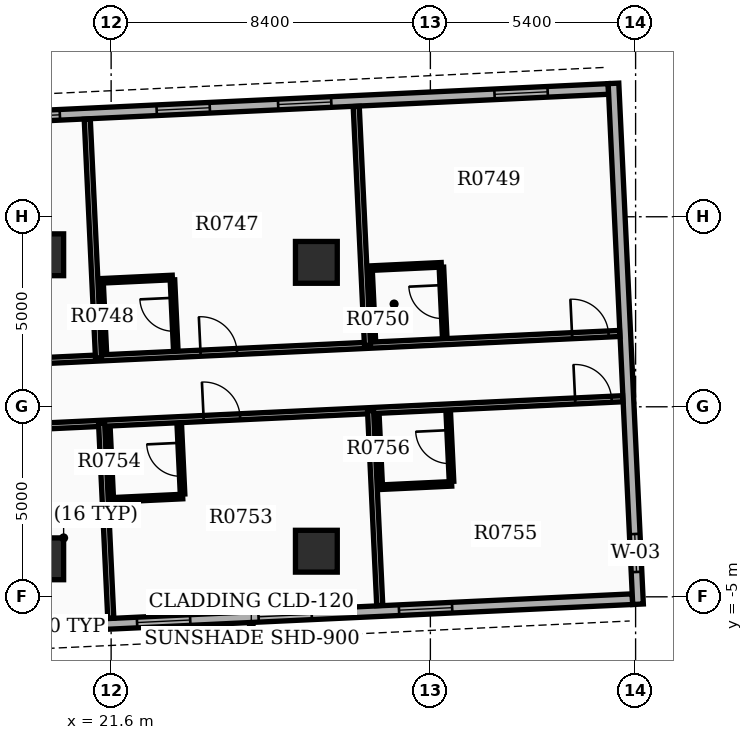
"""IFC4 building model, lengths in metres.
Left out: names, types, materials, properties, quantities, classifications, styles, units other than length and angle.
Written with IfcOpenShell. Run it as: python <this file> out.ifc"""

import sys

from ifc_helpers import new_model, si_unit, direction, frame, frame_2d, origin, origin_2d, place, context, subcontext, project, spatial, rectangle, extrude, element, fill, save


model = new_model("IFC4")
c1 = context("Model", 3, precision=1e-05, world=origin(), true_north=direction((0.0, 1.0)))
c2 = subcontext(c1, "Body", "Model", "MODEL_VIEW")
j1 = project(units=[si_unit("LENGTHUNIT", "METRE"), si_unit("PLANEANGLEUNIT", "RADIAN")], contexts=[c1])
p1 = place(None, origin())
s1 = spatial("IfcSite", under=j1, at=p1, CompositionType="ELEMENT")
p2 = place(p1, origin())
s2 = spatial("IfcBuilding", under=s1, at=p2, CompositionType="ELEMENT")
p3 = place(p2, frame((0.0, 0.0, 52.2)))
s3 = spatial("IfcBuildingStorey", under=s2, at=p3, CompositionType="ELEMENT", Elevation=52.2)
for number, where, z_axis, x_axis in (
    (1, (19.8, -4.0, 0.0), (0.0, 0.0, 1.0), (1.0, 0.0, 0.0)),
    (2, (19.8, 4.0, 0.0), (0.0, 0.0, 1.0), (1.0, 0.0, 0.0)),
    (3, (27.0, -3.8, 0.0), (0.0, 0.0, 1.0), (1.0, 0.0, 0.0)),
    (4, (27.0, 3.8, 0.0), (0.0, 0.0, 1.0), (1.0, 0.0, 0.0)),
):
    element("IfcColumn", number, at=place(p3, frame(where, z_axis=z_axis, x_axis=x_axis)), inside=s3, PredefinedType="COLUMN", context=c2, shape_type="SweptSolid", body=[
        extrude(rectangle(XDim=1.1, YDim=1.1, at=origin_2d()), origin(), (0.0, 0.0, 1.0), 3.9),
    ])
p4 = place(p3, frame((15.24, -6.009, 0.0), z_axis=(0.0, 0.0, 1.0), x_axis=(0.998890015344, 0.047103473814, 0.0)))
e5 = element("IfcWall", 5, at=p4, inside=s3, PredefinedType="STANDARD", context=c2, shape_type="SweptSolid", body=[
    extrude(rectangle(XDim=20.1, YDim=0.28, at=frame_2d((10.05, 0.0))), origin(), (0.0, 0.0, 1.0), 2.91),
])
p5 = place(p4, frame((1.6, 0.0, 0.8)))
e6 = element("IfcOpeningElement", 6, at=p5, cuts=e5, PredefinedType="OPENING", context=c2, shape_type="SweptSolid", body=[
    extrude(rectangle(XDim=1.4, YDim=1.6, at=frame_2d((0.7, 0.8))), frame((0.0, 0.15, 0.0), z_axis=(0.0, -1.0, 0.0), x_axis=(1.0, 0.0, 0.0)), (0.0, 0.0, 1.0), 0.3),
])
p6 = place(p4, frame((7.05, 0.0, 0.8)))
e7 = element("IfcOpeningElement", 7, at=p6, cuts=e5, PredefinedType="OPENING", context=c2, shape_type="SweptSolid", body=[
    extrude(rectangle(XDim=1.4, YDim=1.6, at=frame_2d((0.7, 0.8))), frame((0.0, 0.15, 0.0), z_axis=(0.0, -1.0, 0.0), x_axis=(1.0, 0.0, 0.0)), (0.0, 0.0, 1.0), 0.3),
])
p7 = place(p4, frame((10.25, 0.0, 0.8)))
e8 = element("IfcOpeningElement", 8, at=p7, cuts=e5, PredefinedType="OPENING", context=c2, shape_type="SweptSolid", body=[
    extrude(rectangle(XDim=1.4, YDim=1.6, at=frame_2d((0.7, 0.8))), frame((0.0, 0.15, 0.0), z_axis=(0.0, -1.0, 0.0), x_axis=(1.0, 0.0, 0.0)), (0.0, 0.0, 1.0), 0.3),
])
p8 = place(p4, frame((13.95, 0.0, 0.8)))
e9 = element("IfcOpeningElement", 9, at=p8, cuts=e5, PredefinedType="OPENING", context=c2, shape_type="SweptSolid", body=[
    extrude(rectangle(XDim=1.4, YDim=1.6, at=frame_2d((0.7, 0.8))), frame((0.0, 0.15, 0.0), z_axis=(0.0, -1.0, 0.0), x_axis=(1.0, 0.0, 0.0)), (0.0, 0.0, 1.0), 0.3),
])
p9 = place(p3, frame((34.685, 8.363, 0.0), z_axis=(0.0, 0.0, 1.0), x_axis=(-0.998890015344, -0.047103473814, 0.0)))
e10 = element("IfcWall", 10, at=p9, inside=s3, PredefinedType="STANDARD", context=c2, shape_type="SweptSolid", body=[
    extrude(rectangle(XDim=20.1, YDim=0.28, at=frame_2d((10.05, 0.0))), origin(), (0.0, 0.0, 1.0), 2.91),
])
p10 = place(p9, frame((1.6, 0.0, 0.8)))
e11 = element("IfcOpeningElement", 11, at=p10, cuts=e10, PredefinedType="OPENING", context=c2, shape_type="SweptSolid", body=[
    extrude(rectangle(XDim=1.4, YDim=1.6, at=frame_2d((0.7, 0.8))), frame((0.0, 0.15, 0.0), z_axis=(0.0, -1.0, 0.0), x_axis=(1.0, 0.0, 0.0)), (0.0, 0.0, 1.0), 0.3),
])
p11 = place(p9, frame((7.3, 0.0, 0.8)))
e12 = element("IfcOpeningElement", 12, at=p11, cuts=e10, PredefinedType="OPENING", context=c2, shape_type="SweptSolid", body=[
    extrude(rectangle(XDim=1.4, YDim=1.6, at=frame_2d((0.7, 0.8))), frame((0.0, 0.15, 0.0), z_axis=(0.0, -1.0, 0.0), x_axis=(1.0, 0.0, 0.0)), (0.0, 0.0, 1.0), 0.3),
])
p12 = place(p9, frame((10.5, 0.0, 0.8)))
e13 = element("IfcOpeningElement", 13, at=p12, cuts=e10, PredefinedType="OPENING", context=c2, shape_type="SweptSolid", body=[
    extrude(rectangle(XDim=1.4, YDim=1.6, at=frame_2d((0.7, 0.8))), frame((0.0, 0.15, 0.0), z_axis=(0.0, -1.0, 0.0), x_axis=(1.0, 0.0, 0.0)), (0.0, 0.0, 1.0), 0.3),
])
p13 = place(p9, frame((14.45, 0.0, 0.8)))
e14 = element("IfcOpeningElement", 14, at=p13, cuts=e10, PredefinedType="OPENING", context=c2, shape_type="SweptSolid", body=[
    extrude(rectangle(XDim=1.4, YDim=1.6, at=frame_2d((0.7, 0.8))), frame((0.0, 0.15, 0.0), z_axis=(0.0, -1.0, 0.0), x_axis=(1.0, 0.0, 0.0)), (0.0, 0.0, 1.0), 0.3),
])
p14 = place(p3, frame((35.464, -5.195, 0.0), z_axis=(0.0, 0.0, 1.0), x_axis=(-0.047101845086, 0.998890092147, 0.0)))
e15 = element("IfcWall", 15, at=p14, inside=s3, PredefinedType="STANDARD", context=c2, shape_type="SweptSolid", body=[
    extrude(rectangle(XDim=13.72, YDim=0.28, at=frame_2d((6.86, 0.0))), origin(), (0.0, 0.0, 1.0), 2.91),
])
p15 = place(p14, frame((0.85, 0.0, 0.85)))
e16 = element("IfcOpeningElement", 16, at=p15, cuts=e15, PredefinedType="OPENING", context=c2, shape_type="SweptSolid", body=[
    extrude(rectangle(XDim=1.0, YDim=1.5, at=frame_2d((0.5, 0.75))), frame((0.0, 0.15, 0.0), z_axis=(0.0, -1.0, 0.0), x_axis=(1.0, 0.0, 0.0)), (0.0, 0.0, 1.0), 0.3),
])
p16 = place(p3, frame((14.82, 0.979, 0.0), z_axis=(0.0, 0.0, 1.0), x_axis=(0.998889926753, 0.047105352469, 0.0)))
e17 = element("IfcWall", 17, at=p16, inside=s3, PredefinedType="PARTITIONING", context=c2, shape_type="SweptSolid", body=[
    extrude(rectangle(XDim=20.182, YDim=0.16, at=frame_2d((10.091, 0.0))), origin(), (0.0, 0.0, 1.0), 2.9),
])
p17 = place(p16, frame((2.626, 0.0, 0.0)))
e18 = element("IfcOpeningElement", 18, at=p17, cuts=e17, PredefinedType="OPENING", context=c2, shape_type="SweptSolid", body=[
    extrude(rectangle(XDim=0.96, YDim=2.15, at=frame_2d((0.48, 1.075))), frame((0.0, 0.09, 0.0), z_axis=(0.0, -1.0, 0.0), x_axis=(1.0, 0.0, 0.0)), (0.0, 0.0, 1.0), 0.18),
])
p18 = place(p16, frame((9.143, 0.0, 0.0)))
e19 = element("IfcOpeningElement", 19, at=p18, cuts=e17, PredefinedType="OPENING", context=c2, shape_type="SweptSolid", body=[
    extrude(rectangle(XDim=0.96, YDim=2.15, at=frame_2d((0.48, 1.075))), frame((0.0, 0.09, 0.0), z_axis=(0.0, -1.0, 0.0), x_axis=(1.0, 0.0, 0.0)), (0.0, 0.0, 1.0), 0.18),
])
p19 = place(p16, frame((18.93, 0.0, 0.0)))
e20 = element("IfcOpeningElement", 20, at=p19, cuts=e17, PredefinedType="OPENING", context=c2, shape_type="SweptSolid", body=[
    extrude(rectangle(XDim=0.96, YDim=2.15, at=frame_2d((0.48, 1.075))), frame((0.0, 0.09, 0.0), z_axis=(0.0, -1.0, 0.0), x_axis=(1.0, 0.0, 0.0)), (0.0, 0.0, 1.0), 0.18),
])
for number, where, z_axis, x_axis in (
    (21, (21.268, 1.283, 0.0), (0.0, 0.0, 1.0), (-0.047, 0.999, 0.0)),
    (22, (28.345, 1.617, 0.0), (0.0, 0.0, 1.0), (-0.047, 0.999, 0.0)),
):
    element("IfcWall", number, at=place(p3, frame(where, z_axis=z_axis, x_axis=x_axis)), inside=s3, PredefinedType="PARTITIONING", context=c2, shape_type="SweptSolid", body=[
        extrude(rectangle(XDim=6.292, YDim=0.16, at=frame_2d((3.146, 0.0))), origin(), (0.0, 0.0, 1.0), 2.9),
    ])
p20 = place(p3, frame((23.299, 1.519, 0.0), z_axis=(0.0, 0.0, 1.0), x_axis=(-0.047087116047, 0.998890786574, 0.0)))
e23 = element("IfcWall", 23, at=p20, inside=s3, PredefinedType="PARTITIONING", context=c2, shape_type="SweptSolid", body=[
    extrude(rectangle(XDim=1.82, YDim=0.12, at=frame_2d((0.91, 0.0))), origin(), (0.0, 0.0, 1.0), 2.9),
])
p21 = place(p20, frame((0.47, 0.0, 0.0)))
e24 = element("IfcOpeningElement", 24, at=p21, cuts=e23, PredefinedType="OPENING", context=c2, shape_type="SweptSolid", body=[
    extrude(rectangle(XDim=0.88, YDim=2.1, at=frame_2d((0.44, 1.05))), frame((0.0, 0.07, 0.0), z_axis=(0.0, -1.0, 0.0), x_axis=(1.0, 0.0, 0.0)), (0.0, 0.0, 1.0), 0.14),
])
p22 = place(p3, frame((21.421, 1.431, 0.0), z_axis=(0.0, 0.0, 1.0), x_axis=(-0.047080807099, 0.998891083954, 0.0)))
e25 = element("IfcWall", 25, at=p22, inside=s3, PredefinedType="PARTITIONING", context=c2, shape_type="SweptSolid", body=[
    extrude(rectangle(XDim=1.82, YDim=0.12, at=frame_2d((0.91, 0.0))), origin(), (0.0, 0.0, 1.0), 2.9),
])
p23 = place(p3, frame((21.333, 3.314, 0.0), z_axis=(0.0, 0.0, 1.0), x_axis=(0.998894425757, 0.04700985207, 0.0)))
e26 = element("IfcWall", 26, at=p23, inside=s3, PredefinedType="PARTITIONING", context=c2, shape_type="SweptSolid", body=[
    extrude(rectangle(XDim=1.88, YDim=0.12, at=frame_2d((0.94, 0.0))), origin(), (0.0, 0.0, 1.0), 2.9),
])
p24 = place(p3, frame((30.376, 1.853, 0.0), z_axis=(0.0, 0.0, 1.0), x_axis=(-0.047087116047, 0.998890786574, 0.0)))
e27 = element("IfcWall", 27, at=p24, inside=s3, PredefinedType="PARTITIONING", context=c2, shape_type="SweptSolid", body=[
    extrude(rectangle(XDim=1.82, YDim=0.12, at=frame_2d((0.91, 0.0))), origin(), (0.0, 0.0, 1.0), 2.9),
])
p25 = place(p24, frame((0.47, 0.0, 0.0)))
e28 = element("IfcOpeningElement", 28, at=p25, cuts=e27, PredefinedType="OPENING", context=c2, shape_type="SweptSolid", body=[
    extrude(rectangle(XDim=0.88, YDim=2.1, at=frame_2d((0.44, 1.05))), frame((0.0, 0.07, 0.0), z_axis=(0.0, -1.0, 0.0), x_axis=(1.0, 0.0, 0.0)), (0.0, 0.0, 1.0), 0.14),
])
p26 = place(p3, frame((28.499, 1.764, 0.0), z_axis=(0.0, 0.0, 1.0), x_axis=(-0.047080807099, 0.998891083954, 0.0)))
e29 = element("IfcWall", 29, at=p26, inside=s3, PredefinedType="PARTITIONING", context=c2, shape_type="SweptSolid", body=[
    extrude(rectangle(XDim=1.82, YDim=0.12, at=frame_2d((0.91, 0.0))), origin(), (0.0, 0.0, 1.0), 2.9),
])
p27 = place(p3, frame((28.41, 3.647, 0.0), z_axis=(0.0, 0.0, 1.0), x_axis=(0.998888319371, 0.047139425368, 0.0)))
e30 = element("IfcWall", 30, at=p27, inside=s3, PredefinedType="PARTITIONING", context=c2, shape_type="SweptSolid", body=[
    extrude(rectangle(XDim=1.88, YDim=0.12, at=frame_2d((0.94, 0.0))), origin(), (0.0, 0.0, 1.0), 2.9),
])
p28 = place(p3, frame((14.901, -0.739, 0.0), z_axis=(0.0, 0.0, 1.0), x_axis=(0.998889330628, 0.047117991871, 0.0)))
e31 = element("IfcWall", 31, at=p28, inside=s3, PredefinedType="PARTITIONING", context=c2, shape_type="SweptSolid", body=[
    extrude(rectangle(XDim=20.182, YDim=0.16, at=frame_2d((10.091, 0.0))), origin(), (0.0, 0.0, 1.0), 2.9),
])
p29 = place(p28, frame((2.626, 0.0, 0.0)))
e32 = element("IfcOpeningElement", 32, at=p29, cuts=e31, PredefinedType="OPENING", context=c2, shape_type="SweptSolid", body=[
    extrude(rectangle(XDim=0.96, YDim=2.15, at=frame_2d((0.48, 1.075))), frame((0.0, 0.09, 0.0), z_axis=(0.0, -1.0, 0.0), x_axis=(1.0, 0.0, 0.0)), (0.0, 0.0, 1.0), 0.18),
])
p30 = place(p28, frame((9.143, 0.0, 0.0)))
e33 = element("IfcOpeningElement", 33, at=p30, cuts=e31, PredefinedType="OPENING", context=c2, shape_type="SweptSolid", body=[
    extrude(rectangle(XDim=0.96, YDim=2.15, at=frame_2d((0.48, 1.075))), frame((0.0, 0.09, 0.0), z_axis=(0.0, -1.0, 0.0), x_axis=(1.0, 0.0, 0.0)), (0.0, 0.0, 1.0), 0.18),
])
p31 = place(p28, frame((18.93, 0.0, 0.0)))
e34 = element("IfcOpeningElement", 34, at=p31, cuts=e31, PredefinedType="OPENING", context=c2, shape_type="SweptSolid", body=[
    extrude(rectangle(XDim=0.96, YDim=2.15, at=frame_2d((0.48, 1.075))), frame((0.0, 0.09, 0.0), z_axis=(0.0, -1.0, 0.0), x_axis=(1.0, 0.0, 0.0)), (0.0, 0.0, 1.0), 0.18),
])
for number, where, z_axis, x_axis in (
    (35, (21.349, -0.435, 0.0), (0.0, 0.0, 1.0), (0.047, -0.999, 0.0)),
    (36, (28.426, -0.101, 0.0), (0.0, 0.0, 1.0), (0.047, -0.999, 0.0)),
):
    element("IfcWall", number, at=place(p3, frame(where, z_axis=z_axis, x_axis=x_axis)), inside=s3, PredefinedType="PARTITIONING", context=c2, shape_type="SweptSolid", body=[
        extrude(rectangle(XDim=5.132, YDim=0.16, at=frame_2d((2.566, 0.0))), origin(), (0.0, 0.0, 1.0), 2.9),
    ])
p32 = place(p3, frame((23.479, -2.296, 0.0), z_axis=(0.0, 0.0, 1.0), x_axis=(-0.047087116047, 0.998890786574, 0.0)))
e37 = element("IfcWall", 37, at=p32, inside=s3, PredefinedType="PARTITIONING", context=c2, shape_type="SweptSolid", body=[
    extrude(rectangle(XDim=1.82, YDim=0.12, at=frame_2d((0.91, 0.0))), origin(), (0.0, 0.0, 1.0), 2.9),
])
p33 = place(p32, frame((0.47, 0.0, 0.0)))
e38 = element("IfcOpeningElement", 38, at=p33, cuts=e37, PredefinedType="OPENING", context=c2, shape_type="SweptSolid", body=[
    extrude(rectangle(XDim=0.88, YDim=2.1, at=frame_2d((0.44, 1.05))), frame((0.0, 0.07, 0.0), z_axis=(0.0, -1.0, 0.0), x_axis=(1.0, 0.0, 0.0)), (0.0, 0.0, 1.0), 0.14),
])
p34 = place(p3, frame((21.601, -2.385, 0.0), z_axis=(0.0, 0.0, 1.0), x_axis=(-0.047087116047, 0.998890786574, 0.0)))
e39 = element("IfcWall", 39, at=p34, inside=s3, PredefinedType="PARTITIONING", context=c2, shape_type="SweptSolid", body=[
    extrude(rectangle(XDim=1.82, YDim=0.12, at=frame_2d((0.91, 0.0))), origin(), (0.0, 0.0, 1.0), 2.9),
])
p35 = place(p3, frame((21.604, -2.45, 0.0), z_axis=(0.0, 0.0, 1.0), x_axis=(0.998894425757, 0.04700985207, 0.0)))
e40 = element("IfcWall", 40, at=p35, inside=s3, PredefinedType="PARTITIONING", context=c2, shape_type="SweptSolid", body=[
    extrude(rectangle(XDim=1.88, YDim=0.12, at=frame_2d((0.94, 0.0))), origin(), (0.0, 0.0, 1.0), 2.9),
])
p36 = place(p3, frame((30.556, -1.963, 0.0), z_axis=(0.0, 0.0, 1.0), x_axis=(-0.047080807099, 0.998891083954, 0.0)))
e41 = element("IfcWall", 41, at=p36, inside=s3, PredefinedType="PARTITIONING", context=c2, shape_type="SweptSolid", body=[
    extrude(rectangle(XDim=1.82, YDim=0.12, at=frame_2d((0.91, 0.0))), origin(), (0.0, 0.0, 1.0), 2.9),
])
p37 = place(p36, frame((0.47, 0.0, 0.0)))
e42 = element("IfcOpeningElement", 42, at=p37, cuts=e41, PredefinedType="OPENING", context=c2, shape_type="SweptSolid", body=[
    extrude(rectangle(XDim=0.88, YDim=2.1, at=frame_2d((0.44, 1.05))), frame((0.0, 0.07, 0.0), z_axis=(0.0, -1.0, 0.0), x_axis=(1.0, 0.0, 0.0)), (0.0, 0.0, 1.0), 0.14),
])
p38 = place(p3, frame((28.678, -2.051, 0.0), z_axis=(0.0, 0.0, 1.0), x_axis=(-0.047087116047, 0.998890786574, 0.0)))
e43 = element("IfcWall", 43, at=p38, inside=s3, PredefinedType="PARTITIONING", context=c2, shape_type="SweptSolid", body=[
    extrude(rectangle(XDim=1.82, YDim=0.12, at=frame_2d((0.91, 0.0))), origin(), (0.0, 0.0, 1.0), 2.9),
])
p39 = place(p3, frame((28.681, -2.116, 0.0), z_axis=(0.0, 0.0, 1.0), x_axis=(0.998888319371, 0.047139425368, 0.0)))
e44 = element("IfcWall", 44, at=p39, inside=s3, PredefinedType="PARTITIONING", context=c2, shape_type="SweptSolid", body=[
    extrude(rectangle(XDim=1.88, YDim=0.12, at=frame_2d((0.94, 0.0))), origin(), (0.0, 0.0, 1.0), 2.9),
])
p40 = place(p6, origin())
e45 = element("IfcWindow", 45, at=p40, inside=s3, PartitioningType="SINGLE_PANEL", PredefinedType="WINDOW", context=c2, shape_type="SweptSolid", body=[
    extrude(rectangle(XDim=1.4, YDim=1.6, at=frame_2d((0.7, 0.8))), frame((0.0, 0.03, 0.0), z_axis=(0.0, -1.0, 0.0), x_axis=(1.0, 0.0, 0.0)), (0.0, 0.0, 1.0), 0.06),
])
fill(e7, e45)
p41 = place(p7, origin())
e46 = element("IfcWindow", 46, at=p41, inside=s3, PartitioningType="SINGLE_PANEL", PredefinedType="WINDOW", context=c2, shape_type="SweptSolid", body=[
    extrude(rectangle(XDim=1.4, YDim=1.6, at=frame_2d((0.7, 0.8))), frame((0.0, 0.03, 0.0), z_axis=(0.0, -1.0, 0.0), x_axis=(1.0, 0.0, 0.0)), (0.0, 0.0, 1.0), 0.06),
])
fill(e8, e46)
p42 = place(p8, origin())
e47 = element("IfcWindow", 47, at=p42, inside=s3, PartitioningType="SINGLE_PANEL", PredefinedType="WINDOW", context=c2, shape_type="SweptSolid", body=[
    extrude(rectangle(XDim=1.4, YDim=1.6, at=frame_2d((0.7, 0.8))), frame((0.0, 0.03, 0.0), z_axis=(0.0, -1.0, 0.0), x_axis=(1.0, 0.0, 0.0)), (0.0, 0.0, 1.0), 0.06),
])
fill(e9, e47)
p43 = place(p10, origin())
e48 = element("IfcWindow", 48, at=p43, inside=s3, PartitioningType="SINGLE_PANEL", PredefinedType="WINDOW", context=c2, shape_type="SweptSolid", body=[
    extrude(rectangle(XDim=1.4, YDim=1.6, at=frame_2d((0.7, 0.8))), frame((0.0, 0.03, 0.0), z_axis=(0.0, -1.0, 0.0), x_axis=(1.0, 0.0, 0.0)), (0.0, 0.0, 1.0), 0.06),
])
fill(e11, e48)
p44 = place(p11, origin())
e49 = element("IfcWindow", 49, at=p44, inside=s3, PartitioningType="SINGLE_PANEL", PredefinedType="WINDOW", context=c2, shape_type="SweptSolid", body=[
    extrude(rectangle(XDim=1.4, YDim=1.6, at=frame_2d((0.7, 0.8))), frame((0.0, 0.03, 0.0), z_axis=(0.0, -1.0, 0.0), x_axis=(1.0, 0.0, 0.0)), (0.0, 0.0, 1.0), 0.06),
])
fill(e12, e49)
p45 = place(p12, origin())
e50 = element("IfcWindow", 50, at=p45, inside=s3, PartitioningType="SINGLE_PANEL", PredefinedType="WINDOW", context=c2, shape_type="SweptSolid", body=[
    extrude(rectangle(XDim=1.4, YDim=1.6, at=frame_2d((0.7, 0.8))), frame((0.0, 0.03, 0.0), z_axis=(0.0, -1.0, 0.0), x_axis=(1.0, 0.0, 0.0)), (0.0, 0.0, 1.0), 0.06),
])
fill(e13, e50)
p46 = place(p13, origin())
e51 = element("IfcWindow", 51, at=p46, inside=s3, PartitioningType="SINGLE_PANEL", PredefinedType="WINDOW", context=c2, shape_type="SweptSolid", body=[
    extrude(rectangle(XDim=1.4, YDim=1.6, at=frame_2d((0.7, 0.8))), frame((0.0, 0.03, 0.0), z_axis=(0.0, -1.0, 0.0), x_axis=(1.0, 0.0, 0.0)), (0.0, 0.0, 1.0), 0.06),
])
fill(e14, e51)
p47 = place(p15, origin())
e52 = element("IfcWindow", 52, at=p47, inside=s3, PartitioningType="SINGLE_PANEL", PredefinedType="WINDOW", context=c2, shape_type="SweptSolid", body=[
    extrude(rectangle(XDim=1.0, YDim=1.5, at=frame_2d((0.5, 0.75))), frame((0.0, 0.03, 0.0), z_axis=(0.0, -1.0, 0.0), x_axis=(1.0, 0.0, 0.0)), (0.0, 0.0, 1.0), 0.06),
])
fill(e16, e52)
p48 = place(p18, origin())
e53 = element("IfcDoor", 53, at=p48, inside=s3, OperationType="SINGLE_SWING_LEFT", PredefinedType="DOOR", context=c2, shape_type="SweptSolid", body=[
    extrude(rectangle(XDim=0.96, YDim=2.15, at=frame_2d((0.48, 1.075))), frame((0.0, 0.025, 0.0), z_axis=(0.0, -1.0, 0.0), x_axis=(1.0, 0.0, 0.0)), (0.0, 0.0, 1.0), 0.05),
])
fill(e19, e53)
p49 = place(p21, origin())
e54 = element("IfcDoor", 54, at=p49, inside=s3, OperationType="SINGLE_SWING_RIGHT", PredefinedType="DOOR", context=c2, shape_type="SweptSolid", body=[
    extrude(rectangle(XDim=0.88, YDim=2.1, at=frame_2d((0.44, 1.05))), frame((0.0, 0.025, 0.0), z_axis=(0.0, -1.0, 0.0), x_axis=(1.0, 0.0, 0.0)), (0.0, 0.0, 1.0), 0.05),
])
fill(e24, e54)
p50 = place(p19, origin())
e55 = element("IfcDoor", 55, at=p50, inside=s3, OperationType="SINGLE_SWING_LEFT", PredefinedType="DOOR", context=c2, shape_type="SweptSolid", body=[
    extrude(rectangle(XDim=0.96, YDim=2.15, at=frame_2d((0.48, 1.075))), frame((0.0, 0.025, 0.0), z_axis=(0.0, -1.0, 0.0), x_axis=(1.0, 0.0, 0.0)), (0.0, 0.0, 1.0), 0.05),
])
fill(e20, e55)
p51 = place(p25, origin())
e56 = element("IfcDoor", 56, at=p51, inside=s3, OperationType="SINGLE_SWING_RIGHT", PredefinedType="DOOR", context=c2, shape_type="SweptSolid", body=[
    extrude(rectangle(XDim=0.88, YDim=2.1, at=frame_2d((0.44, 1.05))), frame((0.0, 0.025, 0.0), z_axis=(0.0, -1.0, 0.0), x_axis=(1.0, 0.0, 0.0)), (0.0, 0.0, 1.0), 0.05),
])
fill(e28, e56)
p52 = place(p30, origin())
e57 = element("IfcDoor", 57, at=p52, inside=s3, OperationType="SINGLE_SWING_LEFT", PredefinedType="DOOR", context=c2, shape_type="SweptSolid", body=[
    extrude(rectangle(XDim=0.96, YDim=2.15, at=frame_2d((0.48, 1.075))), frame((0.0, 0.025, 0.0), z_axis=(0.0, -1.0, 0.0), x_axis=(1.0, 0.0, 0.0)), (0.0, 0.0, 1.0), 0.05),
])
fill(e33, e57)
p53 = place(p33, origin())
e58 = element("IfcDoor", 58, at=p53, inside=s3, OperationType="SINGLE_SWING_RIGHT", PredefinedType="DOOR", context=c2, shape_type="SweptSolid", body=[
    extrude(rectangle(XDim=0.88, YDim=2.1, at=frame_2d((0.44, 1.05))), frame((0.0, 0.025, 0.0), z_axis=(0.0, -1.0, 0.0), x_axis=(1.0, 0.0, 0.0)), (0.0, 0.0, 1.0), 0.05),
])
fill(e38, e58)
p54 = place(p31, origin())
e59 = element("IfcDoor", 59, at=p54, inside=s3, OperationType="SINGLE_SWING_LEFT", PredefinedType="DOOR", context=c2, shape_type="SweptSolid", body=[
    extrude(rectangle(XDim=0.96, YDim=2.15, at=frame_2d((0.48, 1.075))), frame((0.0, 0.025, 0.0), z_axis=(0.0, -1.0, 0.0), x_axis=(1.0, 0.0, 0.0)), (0.0, 0.0, 1.0), 0.05),
])
fill(e34, e59)
p55 = place(p37, origin())
e60 = element("IfcDoor", 60, at=p55, inside=s3, OperationType="SINGLE_SWING_RIGHT", PredefinedType="DOOR", context=c2, shape_type="SweptSolid", body=[
    extrude(rectangle(XDim=0.88, YDim=2.1, at=frame_2d((0.44, 1.05))), frame((0.0, 0.025, 0.0), z_axis=(0.0, -1.0, 0.0), x_axis=(1.0, 0.0, 0.0)), (0.0, 0.0, 1.0), 0.05),
])
fill(e42, e60)
save(model, sys.argv[1])
